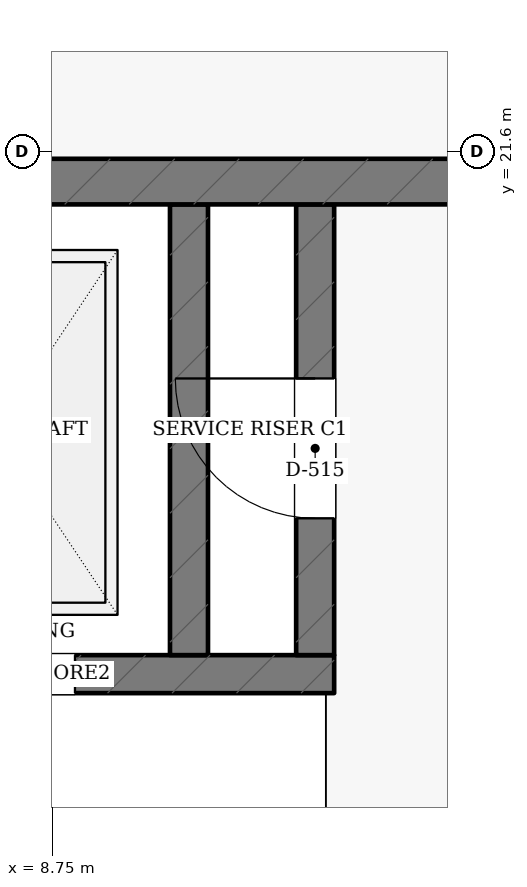
"""IFC4 building model, lengths in metres.
Left out: names, types, materials, properties, quantities, classifications, styles, units other than length and angle.
Written with IfcOpenShell. Run it as: python <this file> out.ifc"""

import sys

from ifc_helpers import new_model, si_unit, direction, frame, frame_2d, origin, place, context, subcontext, project, spatial, rectangle, extrude, element, fill, save


model = new_model("IFC4")
c1 = context("Model", 3, precision=1e-05, world=origin(), true_north=direction((0.0, 1.0)))
c2 = subcontext(c1, "Body", "Model", "MODEL_VIEW")
j1 = project(units=[si_unit("LENGTHUNIT", "METRE"), si_unit("PLANEANGLEUNIT", "RADIAN")], contexts=[c1])
p1 = place(None, origin())
s1 = spatial("IfcSite", under=j1, at=p1, CompositionType="ELEMENT")
p2 = place(p1, origin())
s2 = spatial("IfcBuilding", under=s1, at=p2, CompositionType="ELEMENT")
p3 = place(p2, frame((0.0, 0.0, 14.4)))
s3 = spatial("IfcBuildingStorey", under=s2, at=p3, CompositionType="ELEMENT", Elevation=14.4)
p4 = place(p3, frame((7.025, 18.16, 0.0), z_axis=(0.0, 0.0, 1.0), x_axis=(1.0, 0.0, 0.0)))
e1 = element("IfcWall", 1, at=p4, inside=s3, PredefinedType="SHEAR", context=c2, shape_type="SweptSolid", body=[
    extrude(rectangle(XDim=3.58, YDim=0.25, at=frame_2d((1.79, 0.0))), origin(), (0.0, 0.0, 1.0), 3.6),
])
p5 = place(p4, frame((0.775, 0.0, 0.0)))
e2 = element("IfcOpeningElement", 2, at=p5, cuts=e1, PredefinedType="OPENING", context=c2, shape_type="SweptSolid", body=[
    extrude(rectangle(XDim=1.1, YDim=2.15, at=frame_2d((0.55, 1.075))), frame((0.0, 0.135, 0.0), z_axis=(0.0, -1.0, 0.0), x_axis=(1.0, 0.0, 0.0)), (0.0, 0.0, 1.0), 0.27),
])
p6 = place(p3, frame((9.65, 18.285, 0.0), z_axis=(0.0, 0.0, 1.0), x_axis=(0.0, 1.0, 0.0)))
e3 = element("IfcWall", 3, at=p6, inside=s3, PredefinedType="SHEAR", context=c2, shape_type="SweptSolid", body=[
    extrude(rectangle(XDim=2.965, YDim=0.25, at=frame_2d((1.482, 0.0))), origin(), (0.0, 0.0, 1.0), 3.6),
])
p7 = place(p3, frame((10.48, 18.285, 0.0), z_axis=(0.0, 0.0, 1.0), x_axis=(0.0, 1.0, 0.0)))
e4 = element("IfcWall", 4, at=p7, inside=s3, PredefinedType="SHEAR", context=c2, shape_type="SweptSolid", body=[
    extrude(rectangle(XDim=2.965, YDim=0.25, at=frame_2d((1.482, 0.0))), origin(), (0.0, 0.0, 1.0), 3.6),
])
p8 = place(p7, frame((0.9, 0.0, 0.0)))
e5 = element("IfcOpeningElement", 5, at=p8, cuts=e4, PredefinedType="OPENING", context=c2, shape_type="SweptSolid", body=[
    extrude(rectangle(XDim=0.92, YDim=2.05, at=frame_2d((0.46, 1.025))), frame((0.0, 0.135, 0.0), z_axis=(0.0, -1.0, 0.0), x_axis=(1.0, 0.0, 0.0)), (0.0, 0.0, 1.0), 0.27),
])
p9 = place(p3, frame((0.17, 21.4, 0.0), z_axis=(0.0, 0.0, 1.0), x_axis=(1.0, 0.0, 0.0)))
e6 = element("IfcWall", 6, at=p9, inside=s3, PredefinedType="SHEAR", context=c2, shape_type="SweptSolid", body=[
    extrude(rectangle(XDim=14.23, YDim=0.3, at=frame_2d((7.115, 0.0))), origin(), (0.0, 0.0, 1.0), 3.6),
])
p10 = place(p5, origin())
e7 = element("IfcDoor", 7, at=p10, inside=s3, OperationType="SLIDING_TO_LEFT", PredefinedType="DOOR", context=c2, shape_type="SweptSolid", body=[
    extrude(rectangle(XDim=1.1, YDim=2.15, at=frame_2d((0.55, 1.075))), frame((0.0, 0.025, 0.0), z_axis=(0.0, -1.0, 0.0), x_axis=(1.0, 0.0, 0.0)), (0.0, 0.0, 1.0), 0.05),
])
fill(e2, e7)
p11 = place(p8, origin())
e8 = element("IfcDoor", 8, at=p11, inside=s3, OperationType="SINGLE_SWING_RIGHT", PredefinedType="DOOR", context=c2, shape_type="SweptSolid", body=[
    extrude(rectangle(XDim=0.92, YDim=2.05, at=frame_2d((0.46, 1.025))), frame((0.0, 0.025, 0.0), z_axis=(0.0, -1.0, 0.0), x_axis=(1.0, 0.0, 0.0)), (0.0, 0.0, 1.0), 0.05),
])
fill(e5, e8)
save(model, sys.argv[1])
